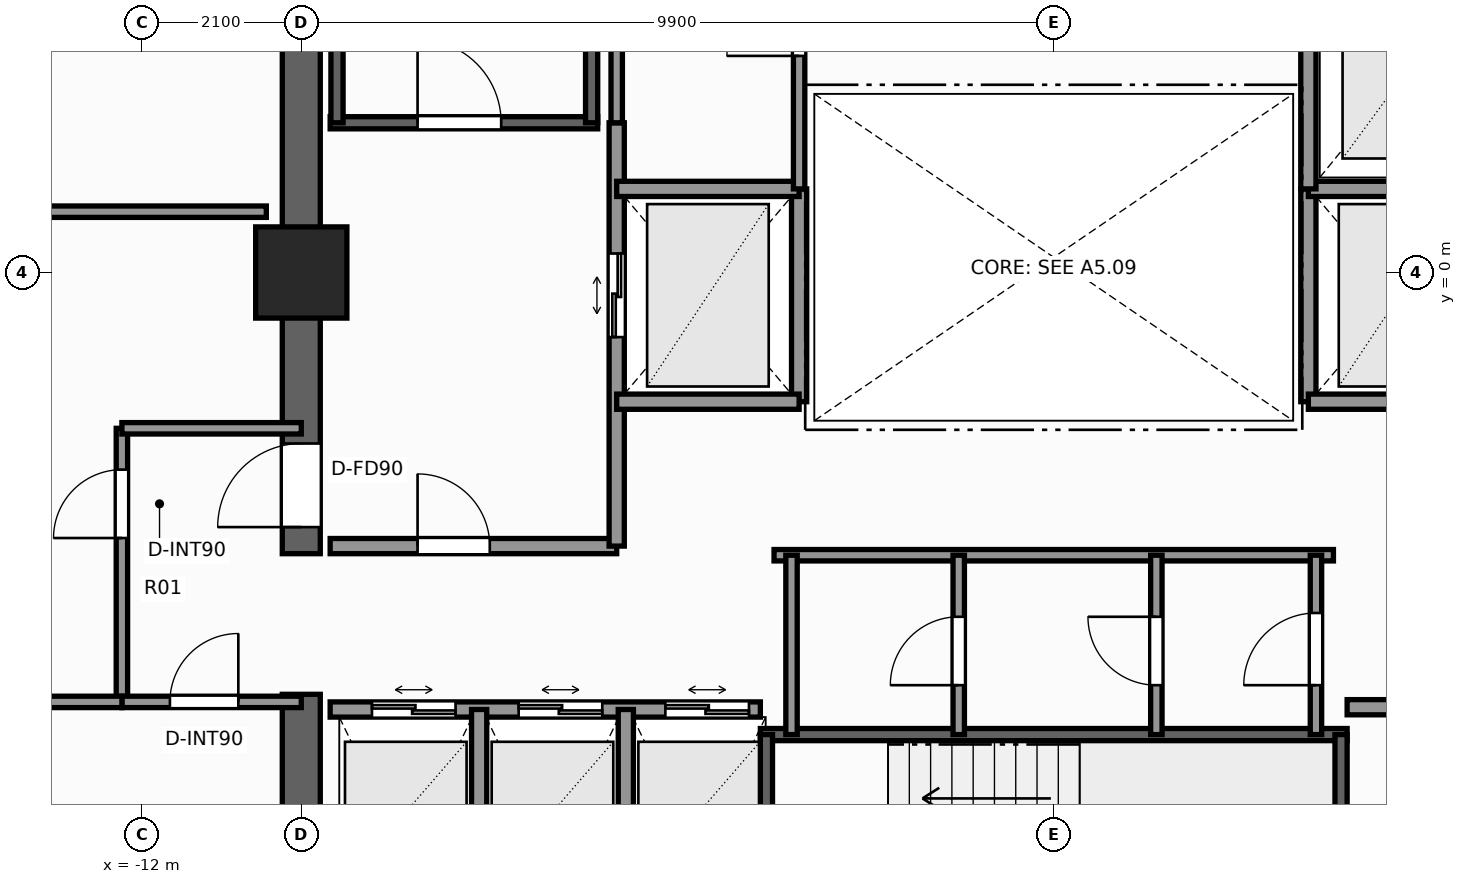
"""IFC4 building model, lengths in metres.
Left out: names, types, materials, properties, quantities, classifications, styles, units other than length and angle.
Written with IfcOpenShell. Run it as: python <this file> out.ifc"""

import sys

from ifc_helpers import new_model, si_unit, direction, frame, frame_2d, origin, origin_2d, place, context, subcontext, project, spatial, rectangle, extrude, element, fill, save


model = new_model("IFC4")
c1 = context("Model", 3, precision=1e-05, world=origin(), true_north=direction((0.0, 1.0)))
c2 = subcontext(c1, "Body", "Model", "MODEL_VIEW")
j1 = project(units=[si_unit("LENGTHUNIT", "METRE"), si_unit("PLANEANGLEUNIT", "RADIAN")], contexts=[c1])
p1 = place(None, origin())
s1 = spatial("IfcSite", under=j1, at=p1, CompositionType="ELEMENT")
p2 = place(p1, origin())
s2 = spatial("IfcBuilding", under=s1, at=p2, CompositionType="ELEMENT")
p3 = place(p2, frame((0.0, 0.0, 138.2)))
s3 = spatial("IfcBuildingStorey", under=s2, at=p3, CompositionType="ELEMENT", Elevation=138.2)
p4 = place(p3, frame((-9.9, -9.65, 0.0), z_axis=(0.0, 0.0, 1.0), x_axis=(0.0, 1.0, 0.0)))
e1 = element("IfcWall", 1, at=p4, inside=s3, PredefinedType="SHEAR", context=c2, shape_type="SweptSolid", body=[
    extrude(rectangle(XDim=4.1, YDim=0.5, at=frame_2d((2.05, 0.0))), origin(), (0.0, 0.0, 1.0), 3.3),
])
p5 = place(p3, frame((-9.9, -3.7, 0.0), z_axis=(0.0, 0.0, 1.0), x_axis=(0.0, 1.0, 0.0)))
e2 = element("IfcWall", 2, at=p5, inside=s3, PredefinedType="SHEAR", context=c2, shape_type="SweptSolid", body=[
    extrude(rectangle(XDim=13.35, YDim=0.5, at=frame_2d((6.675, 0.0))), origin(), (0.0, 0.0, 1.0), 3.3),
])
p6 = place(p5, frame((0.35, 0.0, 0.0)))
e3 = element("IfcOpeningElement", 3, at=p6, cuts=e2, PredefinedType="OPENING", context=c2, shape_type="SweptSolid", body=[
    extrude(rectangle(XDim=1.1, YDim=2.2, at=frame_2d((0.55, 1.1))), frame((0.0, 0.26, 0.0), z_axis=(0.0, -1.0, 0.0), x_axis=(1.0, 0.0, 0.0)), (0.0, 0.0, 1.0), 0.52),
])
p7 = place(p3, frame((-9.9, 0.0, 0.0), z_axis=(0.0, 0.0, 1.0), x_axis=(1.0, 0.0, 0.0)))
e4 = element("IfcColumn", 4, at=p7, inside=s3, PredefinedType="COLUMN", context=c2, shape_type="SweptSolid", body=[
    extrude(rectangle(XDim=1.2, YDim=1.2, at=origin_2d()), origin(), (0.0, 0.0, 1.0), 3.3),
])
p8 = place(p3, frame((-9.52, 1.97, 0.0), z_axis=(0.0, 0.0, 1.0), x_axis=(1.0, 0.0, 0.0)))
e5 = element("IfcWall", 5, at=p8, inside=s3, PredefinedType="SHEAR", context=c2, shape_type="SweptSolid", body=[
    extrude(rectangle(XDim=3.52, YDim=0.16, at=frame_2d((1.76, 0.0))), origin(), (0.0, 0.0, 1.0), 3.3),
])
p9 = place(p8, frame((1.15, 0.0, 0.0)))
e6 = element("IfcOpeningElement", 6, at=p9, cuts=e5, PredefinedType="OPENING", context=c2, shape_type="SweptSolid", body=[
    extrude(rectangle(XDim=1.1, YDim=2.2, at=frame_2d((0.55, 1.1))), frame((0.0, 0.09, 0.0), z_axis=(0.0, -1.0, 0.0), x_axis=(1.0, 0.0, 0.0)), (0.0, 0.0, 1.0), 0.18),
])
for number, where, z_axis, x_axis in (
    (7, (-9.43, 1.97, 0.0), (0.0, 0.0, 1.0), (0.0, 1.0, 0.0)),
    (8, (-6.08, 1.97, 0.0), (0.0, 0.0, 1.0), (0.0, 1.0, 0.0)),
):
    element("IfcWall", number, at=place(p3, frame(where, z_axis=z_axis, x_axis=x_axis)), inside=s3, PredefinedType="SHEAR", context=c2, shape_type="SweptSolid", body=[
        extrude(rectangle(XDim=7.56, YDim=0.16, at=frame_2d((3.78, 0.0))), origin(), (0.0, 0.0, 1.0), 3.3),
    ])
p10 = place(p3, frame((-3.86, -6.08, 0.0), z_axis=(0.0, 0.0, 1.0), x_axis=(1.0, 0.0, 0.0)))
e9 = element("IfcWall", 9, at=p10, inside=s3, PredefinedType="SHEAR", context=c2, shape_type="SweptSolid", body=[
    extrude(rectangle(XDim=7.72, YDim=0.16, at=frame_2d((3.86, 0.0))), origin(), (0.0, 0.0, 1.0), 3.3),
])
for number, where, z_axis, x_axis in (
    (10, (-3.78, -9.43, 0.0), (0.0, 0.0, 1.0), (0.0, 1.0, 0.0)),
    (11, (3.78, -9.43, 0.0), (0.0, 0.0, 1.0), (0.0, 1.0, 0.0)),
):
    element("IfcWall", number, at=place(p3, frame(where, z_axis=z_axis, x_axis=x_axis)), inside=s3, PredefinedType="SHEAR", context=c2, shape_type="SweptSolid", body=[
        extrude(rectangle(XDim=3.35, YDim=0.16, at=frame_2d((1.675, 0.0))), origin(), (0.0, 0.0, 1.0), 3.3),
    ])
p11 = place(p3, frame((-9.52, -3.6, 0.0), z_axis=(0.0, 0.0, 1.0), x_axis=(1.0, 0.0, 0.0)))
e12 = element("IfcWall", 12, at=p11, inside=s3, PredefinedType="SOLIDWALL", context=c2, shape_type="SweptSolid", body=[
    extrude(rectangle(XDim=3.77, YDim=0.2, at=frame_2d((1.885, 0.0))), origin(), (0.0, 0.0, 1.0), 3.1),
])
p12 = place(p11, frame((1.15, 0.0, 0.0)))
e13 = element("IfcOpeningElement", 13, at=p12, cuts=e12, PredefinedType="OPENING", context=c2, shape_type="SweptSolid", body=[
    extrude(rectangle(XDim=0.95, YDim=2.06, at=frame_2d((0.475, 1.03))), frame((0.0, 0.11, 0.0), z_axis=(0.0, -1.0, 0.0), x_axis=(1.0, 0.0, 0.0)), (0.0, 0.0, 1.0), 0.22),
])
p13 = place(p3, frame((-5.75, -3.6, 0.0), z_axis=(0.0, 0.0, 1.0), x_axis=(0.0, 1.0, 0.0)))
e14 = element("IfcWall", 14, at=p13, inside=s3, PredefinedType="SOLIDWALL", context=c2, shape_type="SweptSolid", body=[
    extrude(rectangle(XDim=5.57, YDim=0.2, at=frame_2d((2.785, 0.0))), origin(), (0.0, 0.0, 1.0), 2.735),
])
p14 = place(p13, frame((2.75, 0.0, 0.0)))
e15 = element("IfcOpeningElement", 15, at=p14, cuts=e14, PredefinedType="OPENING", context=c2, shape_type="SweptSolid", body=[
    extrude(rectangle(XDim=1.1, YDim=2.2, at=frame_2d((0.55, 1.1))), frame((0.0, 0.11, 0.0), z_axis=(0.0, -1.0, 0.0), x_axis=(1.0, 0.0, 0.0)), (0.0, 0.0, 1.0), 0.22),
])
p15 = place(p3, frame((-3.35, -1.7, 0.0), z_axis=(0.0, 0.0, 1.0), x_axis=(0.0, 1.0, 0.0)))
e16 = element("IfcWall", 16, at=p15, inside=s3, PredefinedType="SOLIDWALL", context=c2, shape_type="SweptSolid", body=[
    extrude(rectangle(XDim=2.8, YDim=0.2, at=frame_2d((1.4, 0.0))), origin(), (0.0, 0.0, 1.0), 2.735),
])
for number, where, z_axis, x_axis in (
    (17, (-5.75, -1.7, 0.0), (0.0, 0.0, 1.0), (1.0, 0.0, 0.0)),
    (18, (-5.75, 1.1, 0.0), (0.0, 0.0, 1.0), (1.0, 0.0, 0.0)),
):
    element("IfcWall", number, at=place(p3, frame(where, z_axis=z_axis, x_axis=x_axis)), inside=s3, PredefinedType="SOLIDWALL", context=c2, shape_type="SweptSolid", body=[
        extrude(rectangle(XDim=2.4, YDim=0.2, at=frame_2d((1.2, 0.0))), origin(), (0.0, 0.0, 1.0), 3.1),
    ])
p16 = place(p3, frame((3.35, -1.7, 0.0), z_axis=(0.0, 0.0, 1.0), x_axis=(0.0, 1.0, 0.0)))
e19 = element("IfcWall", 19, at=p16, inside=s3, PredefinedType="SOLIDWALL", context=c2, shape_type="SweptSolid", body=[
    extrude(rectangle(XDim=2.8, YDim=0.2, at=frame_2d((1.4, 0.0))), origin(), (0.0, 0.0, 1.0), 2.735),
])
for number, where, z_axis, x_axis in (
    (20, (3.35, -1.7, 0.0), (0.0, 0.0, 1.0), (1.0, 0.0, 0.0)),
    (21, (3.35, 1.1, 0.0), (0.0, 0.0, 1.0), (1.0, 0.0, 0.0)),
):
    element("IfcWall", number, at=place(p3, frame(where, z_axis=z_axis, x_axis=x_axis)), inside=s3, PredefinedType="SOLIDWALL", context=c2, shape_type="SweptSolid", body=[
        extrude(rectangle(XDim=2.4, YDim=0.2, at=frame_2d((1.2, 0.0))), origin(), (0.0, 0.0, 1.0), 3.1),
    ])
p17 = place(p3, frame((3.35, 1.1, 0.0), z_axis=(0.0, 0.0, 1.0), x_axis=(0.0, 1.0, 0.0)))
e22 = element("IfcWall", 22, at=p17, inside=s3, PredefinedType="SOLIDWALL", context=c2, shape_type="SweptSolid", body=[
    extrude(rectangle(XDim=3.2, YDim=0.2, at=frame_2d((1.6, 0.0))), origin(), (0.0, 0.0, 1.0), 2.735),
])
p18 = place(p3, frame((-9.52, -5.75, 0.0), z_axis=(0.0, 0.0, 1.0), x_axis=(1.0, 0.0, 0.0)))
e23 = element("IfcWall", 23, at=p18, inside=s3, PredefinedType="SOLIDWALL", context=c2, shape_type="SweptSolid", body=[
    extrude(rectangle(XDim=5.66, YDim=0.2, at=frame_2d((2.83, 0.0))), origin(), (0.0, 0.0, 1.0), 3.1),
])
p19 = place(p18, frame((0.55, 0.0, 0.0)))
e24 = element("IfcOpeningElement", 24, at=p19, cuts=e23, PredefinedType="OPENING", context=c2, shape_type="SweptSolid", body=[
    extrude(rectangle(XDim=1.1, YDim=2.2, at=frame_2d((0.55, 1.1))), frame((0.0, 0.11, 0.0), z_axis=(0.0, -1.0, 0.0), x_axis=(1.0, 0.0, 0.0)), (0.0, 0.0, 1.0), 0.22),
])
p20 = place(p18, frame((2.48, 0.0, 0.0)))
e25 = element("IfcOpeningElement", 25, at=p20, cuts=e23, PredefinedType="OPENING", context=c2, shape_type="SweptSolid", body=[
    extrude(rectangle(XDim=1.1, YDim=2.2, at=frame_2d((0.55, 1.1))), frame((0.0, 0.11, 0.0), z_axis=(0.0, -1.0, 0.0), x_axis=(1.0, 0.0, 0.0)), (0.0, 0.0, 1.0), 0.22),
])
p21 = place(p18, frame((4.41, 0.0, 0.0)))
e26 = element("IfcOpeningElement", 26, at=p21, cuts=e23, PredefinedType="OPENING", context=c2, shape_type="SweptSolid", body=[
    extrude(rectangle(XDim=1.1, YDim=2.2, at=frame_2d((0.55, 1.1))), frame((0.0, 0.11, 0.0), z_axis=(0.0, -1.0, 0.0), x_axis=(1.0, 0.0, 0.0)), (0.0, 0.0, 1.0), 0.22),
])
for number, where, z_axis, x_axis in (
    (27, (-7.56, -9.52, 0.0), (0.0, 0.0, 1.0), (0.0, 1.0, 0.0)),
    (28, (-5.63, -9.52, 0.0), (0.0, 0.0, 1.0), (0.0, 1.0, 0.0)),
):
    element("IfcWall", number, at=place(p3, frame(where, z_axis=z_axis, x_axis=x_axis)), inside=s3, PredefinedType="SOLIDWALL", context=c2, shape_type="SweptSolid", body=[
        extrude(rectangle(XDim=3.77, YDim=0.2, at=frame_2d((1.885, 0.0))), origin(), (0.0, 0.0, 1.0), 3.1),
    ])
p22 = place(p3, frame((3.86, -5.72, 0.0), z_axis=(0.0, 0.0, 1.0), x_axis=(1.0, 0.0, 0.0)))
e29 = element("IfcWall", 29, at=p22, inside=s3, PredefinedType="SOLIDWALL", context=c2, shape_type="SweptSolid", body=[
    extrude(rectangle(XDim=5.66, YDim=0.2, at=frame_2d((2.83, 0.0))), origin(), (0.0, 0.0, 1.0), 3.1),
])
p23 = place(p22, frame((0.85, 0.0, 0.0)))
e30 = element("IfcOpeningElement", 30, at=p23, cuts=e29, PredefinedType="OPENING", context=c2, shape_type="SweptSolid", body=[
    extrude(rectangle(XDim=0.95, YDim=2.06, at=frame_2d((0.475, 1.03))), frame((0.0, 0.11, 0.0), z_axis=(0.0, -1.0, 0.0), x_axis=(1.0, 0.0, 0.0)), (0.0, 0.0, 1.0), 0.22),
])
p24 = place(p22, frame((3.6, 0.0, 0.0)))
e31 = element("IfcOpeningElement", 31, at=p24, cuts=e29, PredefinedType="OPENING", context=c2, shape_type="SweptSolid", body=[
    extrude(rectangle(XDim=0.85, YDim=2.03, at=frame_2d((0.425, 1.015))), frame((0.0, 0.11, 0.0), z_axis=(0.0, -1.0, 0.0), x_axis=(1.0, 0.0, 0.0)), (0.0, 0.0, 1.0), 0.22),
])
p25 = place(p3, frame((-3.68, -3.72, 0.0), z_axis=(0.0, 0.0, 1.0), x_axis=(1.0, 0.0, 0.0)))
e32 = element("IfcWall", 32, at=p25, inside=s3, PredefinedType="PARTITIONING", context=c2, shape_type="SweptSolid", body=[
    extrude(rectangle(XDim=7.36, YDim=0.15, at=frame_2d((3.68, 0.0))), origin(), (0.0, 0.0, 1.0), 3.1),
])
p26 = place(p3, frame((3.45, -6.08, 0.0), z_axis=(0.0, 0.0, 1.0), x_axis=(0.0, 1.0, 0.0)))
e33 = element("IfcWall", 33, at=p26, inside=s3, PredefinedType="PARTITIONING", context=c2, shape_type="SweptSolid", body=[
    extrude(rectangle(XDim=2.36, YDim=0.15, at=frame_2d((1.18, 0.0))), origin(), (0.0, 0.0, 1.0), 3.1),
])
p27 = place(p26, frame((0.65, 0.0, 0.0)))
e34 = element("IfcOpeningElement", 34, at=p27, cuts=e33, PredefinedType="OPENING", context=c2, shape_type="SweptSolid", body=[
    extrude(rectangle(XDim=0.95, YDim=2.06, at=frame_2d((0.475, 1.03))), frame((0.0, 0.085, 0.0), z_axis=(0.0, -1.0, 0.0), x_axis=(1.0, 0.0, 0.0)), (0.0, 0.0, 1.0), 0.17),
])
p28 = place(p3, frame((-3.45, -6.08, 0.0), z_axis=(0.0, 0.0, 1.0), x_axis=(0.0, 1.0, 0.0)))
e35 = element("IfcWall", 35, at=p28, inside=s3, PredefinedType="PARTITIONING", context=c2, shape_type="SweptSolid", body=[
    extrude(rectangle(XDim=2.36, YDim=0.15, at=frame_2d((1.18, 0.0))), origin(), (0.0, 0.0, 1.0), 3.1),
])
p29 = place(p3, frame((1.35, -6.08, 0.0), z_axis=(0.0, 0.0, 1.0), x_axis=(0.0, 1.0, 0.0)))
e36 = element("IfcWall", 36, at=p29, inside=s3, PredefinedType="PARTITIONING", context=c2, shape_type="SweptSolid", body=[
    extrude(rectangle(XDim=2.36, YDim=0.15, at=frame_2d((1.18, 0.0))), origin(), (0.0, 0.0, 1.0), 3.1),
])
p30 = place(p29, frame((0.65, 0.0, 0.0)))
e37 = element("IfcOpeningElement", 37, at=p30, cuts=e36, PredefinedType="OPENING", context=c2, shape_type="SweptSolid", body=[
    extrude(rectangle(XDim=0.9, YDim=2.06, at=frame_2d((0.45, 1.03))), frame((0.0, 0.085, 0.0), z_axis=(0.0, -1.0, 0.0), x_axis=(1.0, 0.0, 0.0)), (0.0, 0.0, 1.0), 0.17),
])
p31 = place(p3, frame((-1.25, -6.08, 0.0), z_axis=(0.0, 0.0, 1.0), x_axis=(0.0, 1.0, 0.0)))
e38 = element("IfcWall", 38, at=p31, inside=s3, PredefinedType="PARTITIONING", context=c2, shape_type="SweptSolid", body=[
    extrude(rectangle(XDim=2.36, YDim=0.15, at=frame_2d((1.18, 0.0))), origin(), (0.0, 0.0, 1.0), 3.1),
])
p32 = place(p31, frame((0.65, 0.0, 0.0)))
e39 = element("IfcOpeningElement", 39, at=p32, cuts=e38, PredefinedType="OPENING", context=c2, shape_type="SweptSolid", body=[
    extrude(rectangle(XDim=0.9, YDim=2.06, at=frame_2d((0.45, 1.03))), frame((0.0, 0.085, 0.0), z_axis=(0.0, -1.0, 0.0), x_axis=(1.0, 0.0, 0.0)), (0.0, 0.0, 1.0), 0.17),
])
p33 = place(p3, frame((-3.35, 1.1, 0.0), z_axis=(0.0, 0.0, 1.0), x_axis=(0.0, 1.0, 0.0)))
e40 = element("IfcWall", 40, at=p33, inside=s3, PredefinedType="PARTITIONING", context=c2, shape_type="SweptSolid", body=[
    extrude(rectangle(XDim=3.2, YDim=0.15, at=frame_2d((1.6, 0.0))), origin(), (0.0, 0.0, 1.0), 2.735),
])
p34 = place(p33, frame((1.75, 0.0, 0.0)))
e41 = element("IfcOpeningElement", 41, at=p34, cuts=e40, PredefinedType="OPENING", context=c2, shape_type="SweptSolid", body=[
    extrude(rectangle(XDim=0.95, YDim=2.06, at=frame_2d((0.475, 1.03))), frame((0.0, 0.085, 0.0), z_axis=(0.0, -1.0, 0.0), x_axis=(1.0, 0.0, 0.0)), (0.0, 0.0, 1.0), 0.17),
])
p35 = place(p3, frame((-5.75, 1.97, 0.0), z_axis=(0.0, 0.0, 1.0), x_axis=(0.0, 1.0, 0.0)))
e42 = element("IfcWall", 42, at=p35, inside=s3, PredefinedType="PARTITIONING", context=c2, shape_type="SweptSolid", body=[
    extrude(rectangle(XDim=2.33, YDim=0.15, at=frame_2d((1.165, 0.0))), origin(), (0.0, 0.0, 1.0), 2.735),
])
p36 = place(p3, frame((-12.26, -5.65, 0.0), z_axis=(0.0, 0.0, 1.0), x_axis=(0.0, 1.0, 0.0)))
e43 = element("IfcWall", 43, at=p36, inside=s3, PredefinedType="PARTITIONING", context=c2, shape_type="SweptSolid", body=[
    extrude(rectangle(XDim=3.6, YDim=0.15, at=frame_2d((1.8, 0.0))), origin(), (0.0, 0.0, 1.0), 2.312),
])
p37 = place(p36, frame((2.156, 0.0, 0.0)))
e44 = element("IfcOpeningElement", 44, at=p37, cuts=e43, PredefinedType="OPENING", context=c2, shape_type="SweptSolid", body=[
    extrude(rectangle(XDim=0.9, YDim=2.06, at=frame_2d((0.45, 1.03))), frame((0.0, 0.085, 0.0), z_axis=(0.0, -1.0, 0.0), x_axis=(1.0, 0.0, 0.0)), (0.0, 0.0, 1.0), 0.17),
])
p38 = place(p3, frame((-12.26, -2.05, 0.0), z_axis=(0.0, 0.0, 1.0), x_axis=(1.0, 0.0, 0.0)))
e45 = element("IfcWall", 45, at=p38, inside=s3, PredefinedType="PARTITIONING", context=c2, shape_type="SweptSolid", body=[
    extrude(rectangle(XDim=2.36, YDim=0.15, at=frame_2d((1.18, 0.0))), origin(), (0.0, 0.0, 1.0), 2.389),
])
p39 = place(p3, frame((-12.26, -5.65, 0.0), z_axis=(0.0, 0.0, 1.0), x_axis=(1.0, 0.0, 0.0)))
e46 = element("IfcWall", 46, at=p39, inside=s3, PredefinedType="PARTITIONING", context=c2, shape_type="SweptSolid", body=[
    extrude(rectangle(XDim=2.36, YDim=0.15, at=frame_2d((1.18, 0.0))), origin(), (0.0, 0.0, 1.0), 3.1),
])
p40 = place(p39, frame((0.632, 0.0, 0.0)))
e47 = element("IfcOpeningElement", 47, at=p40, cuts=e46, PredefinedType="OPENING", context=c2, shape_type="SweptSolid", body=[
    extrude(rectangle(XDim=0.9, YDim=2.06, at=frame_2d((0.45, 1.03))), frame((0.0, 0.085, 0.0), z_axis=(0.0, -1.0, 0.0), x_axis=(1.0, 0.0, 0.0)), (0.0, 0.0, 1.0), 0.17),
])
p41 = place(p3, frame((-17.98, 0.8, 0.0), z_axis=(0.0, 0.0, 1.0), x_axis=(1.0, 0.0, 0.0)))
e48 = element("IfcWall", 48, at=p41, inside=s3, PredefinedType="PARTITIONING", context=c2, shape_type="SweptSolid", body=[
    extrude(rectangle(XDim=7.62, YDim=0.15, at=frame_2d((3.81, 0.0))), origin(), (0.0, 0.0, 1.0), 2.469),
])
p42 = place(p3, frame((-17.98, -5.65, 0.0), z_axis=(0.0, 0.0, 1.0), x_axis=(1.0, 0.0, 0.0)))
e49 = element("IfcWall", 49, at=p42, inside=s3, PredefinedType="PARTITIONING", context=c2, shape_type="SweptSolid", body=[
    extrude(rectangle(XDim=5.72, YDim=0.15, at=frame_2d((2.86, 0.0))), origin(), (0.0, 0.0, 1.0), 2.469),
])
p43 = place(p9, origin())
e50 = element("IfcDoor", 50, at=p43, inside=s3, OperationType="SINGLE_SWING_LEFT", PredefinedType="DOOR", context=c2, shape_type="SweptSolid", body=[
    extrude(rectangle(XDim=1.1, YDim=2.2, at=frame_2d((0.55, 1.1))), frame((0.0, 0.025, 0.0), z_axis=(0.0, -1.0, 0.0), x_axis=(1.0, 0.0, 0.0)), (0.0, 0.0, 1.0), 0.05),
])
fill(e6, e50)
p44 = place(p6, origin())
e51 = element("IfcDoor", 51, at=p44, inside=s3, OperationType="SINGLE_SWING_LEFT", PredefinedType="DOOR", context=c2, shape_type="SweptSolid", body=[
    extrude(rectangle(XDim=1.1, YDim=2.2, at=frame_2d((0.55, 1.1))), frame((0.0, 0.025, 0.0), z_axis=(0.0, -1.0, 0.0), x_axis=(1.0, 0.0, 0.0)), (0.0, 0.0, 1.0), 0.05),
])
fill(e3, e51)
p45 = place(p14, origin())
e52 = element("IfcDoor", 52, at=p45, inside=s3, OperationType="DOUBLE_DOOR_SLIDING", PredefinedType="DOOR", context=c2, shape_type="SweptSolid", body=[
    extrude(rectangle(XDim=1.1, YDim=2.2, at=frame_2d((0.55, 1.1))), frame((0.0, 0.025, 0.0), z_axis=(0.0, -1.0, 0.0), x_axis=(1.0, 0.0, 0.0)), (0.0, 0.0, 1.0), 0.05),
])
fill(e15, e52)
p46 = place(p19, origin())
e53 = element("IfcDoor", 53, at=p46, inside=s3, OperationType="DOUBLE_DOOR_SLIDING", PredefinedType="DOOR", context=c2, shape_type="SweptSolid", body=[
    extrude(rectangle(XDim=1.1, YDim=2.2, at=frame_2d((0.55, 1.1))), frame((0.0, 0.025, 0.0), z_axis=(0.0, -1.0, 0.0), x_axis=(1.0, 0.0, 0.0)), (0.0, 0.0, 1.0), 0.05),
])
fill(e24, e53)
p47 = place(p20, origin())
e54 = element("IfcDoor", 54, at=p47, inside=s3, OperationType="DOUBLE_DOOR_SLIDING", PredefinedType="DOOR", context=c2, shape_type="SweptSolid", body=[
    extrude(rectangle(XDim=1.1, YDim=2.2, at=frame_2d((0.55, 1.1))), frame((0.0, 0.025, 0.0), z_axis=(0.0, -1.0, 0.0), x_axis=(1.0, 0.0, 0.0)), (0.0, 0.0, 1.0), 0.05),
])
fill(e25, e54)
p48 = place(p21, origin())
e55 = element("IfcDoor", 55, at=p48, inside=s3, OperationType="DOUBLE_DOOR_SLIDING", PredefinedType="DOOR", context=c2, shape_type="SweptSolid", body=[
    extrude(rectangle(XDim=1.1, YDim=2.2, at=frame_2d((0.55, 1.1))), frame((0.0, 0.025, 0.0), z_axis=(0.0, -1.0, 0.0), x_axis=(1.0, 0.0, 0.0)), (0.0, 0.0, 1.0), 0.05),
])
fill(e26, e55)
p49 = place(p12, origin())
e56 = element("IfcDoor", 56, at=p49, inside=s3, OperationType="SINGLE_SWING_LEFT", PredefinedType="DOOR", context=c2, shape_type="SweptSolid", body=[
    extrude(rectangle(XDim=0.95, YDim=2.06, at=frame_2d((0.475, 1.03))), frame((0.0, 0.025, 0.0), z_axis=(0.0, -1.0, 0.0), x_axis=(1.0, 0.0, 0.0)), (0.0, 0.0, 1.0), 0.05),
])
fill(e13, e56)
p50 = place(p27, origin())
e57 = element("IfcDoor", 57, at=p50, inside=s3, OperationType="SINGLE_SWING_LEFT", PredefinedType="DOOR", context=c2, shape_type="SweptSolid", body=[
    extrude(rectangle(XDim=0.95, YDim=2.06, at=frame_2d((0.475, 1.03))), frame((0.0, 0.025, 0.0), z_axis=(0.0, -1.0, 0.0), x_axis=(1.0, 0.0, 0.0)), (0.0, 0.0, 1.0), 0.05),
])
fill(e34, e57)
p51 = place(p30, origin())
e58 = element("IfcDoor", 58, at=p51, inside=s3, OperationType="SINGLE_SWING_RIGHT", PredefinedType="DOOR", context=c2, shape_type="SweptSolid", body=[
    extrude(rectangle(XDim=0.9, YDim=2.06, at=frame_2d((0.45, 1.03))), frame((0.0, 0.025, 0.0), z_axis=(0.0, -1.0, 0.0), x_axis=(1.0, 0.0, 0.0)), (0.0, 0.0, 1.0), 0.05),
])
fill(e37, e58)
p52 = place(p32, origin())
e59 = element("IfcDoor", 59, at=p52, inside=s3, OperationType="SINGLE_SWING_LEFT", PredefinedType="DOOR", context=c2, shape_type="SweptSolid", body=[
    extrude(rectangle(XDim=0.9, YDim=2.06, at=frame_2d((0.45, 1.03))), frame((0.0, 0.025, 0.0), z_axis=(0.0, -1.0, 0.0), x_axis=(1.0, 0.0, 0.0)), (0.0, 0.0, 1.0), 0.05),
])
fill(e39, e59)
p53 = place(p34, origin())
e60 = element("IfcDoor", 60, at=p53, inside=s3, OperationType="SINGLE_SWING_LEFT", PredefinedType="DOOR", context=c2, shape_type="SweptSolid", body=[
    extrude(rectangle(XDim=0.95, YDim=2.06, at=frame_2d((0.475, 1.03))), frame((0.0, 0.025, 0.0), z_axis=(0.0, -1.0, 0.0), x_axis=(1.0, 0.0, 0.0)), (0.0, 0.0, 1.0), 0.05),
])
fill(e41, e60)
p54 = place(p37, origin())
e61 = element("IfcDoor", 61, at=p54, inside=s3, OperationType="SINGLE_SWING_LEFT", PredefinedType="DOOR", context=c2, shape_type="SweptSolid", body=[
    extrude(rectangle(XDim=0.9, YDim=2.06, at=frame_2d((0.45, 1.03))), frame((0.0, 0.025, 0.0), z_axis=(0.0, -1.0, 0.0), x_axis=(1.0, 0.0, 0.0)), (0.0, 0.0, 1.0), 0.05),
])
fill(e44, e61)
p55 = place(p40, origin())
e62 = element("IfcDoor", 62, at=p55, inside=s3, OperationType="SINGLE_SWING_RIGHT", PredefinedType="DOOR", context=c2, shape_type="SweptSolid", body=[
    extrude(rectangle(XDim=0.9, YDim=2.06, at=frame_2d((0.45, 1.03))), frame((0.0, 0.025, 0.0), z_axis=(0.0, -1.0, 0.0), x_axis=(1.0, 0.0, 0.0)), (0.0, 0.0, 1.0), 0.05),
])
fill(e47, e62)
save(model, sys.argv[1])
